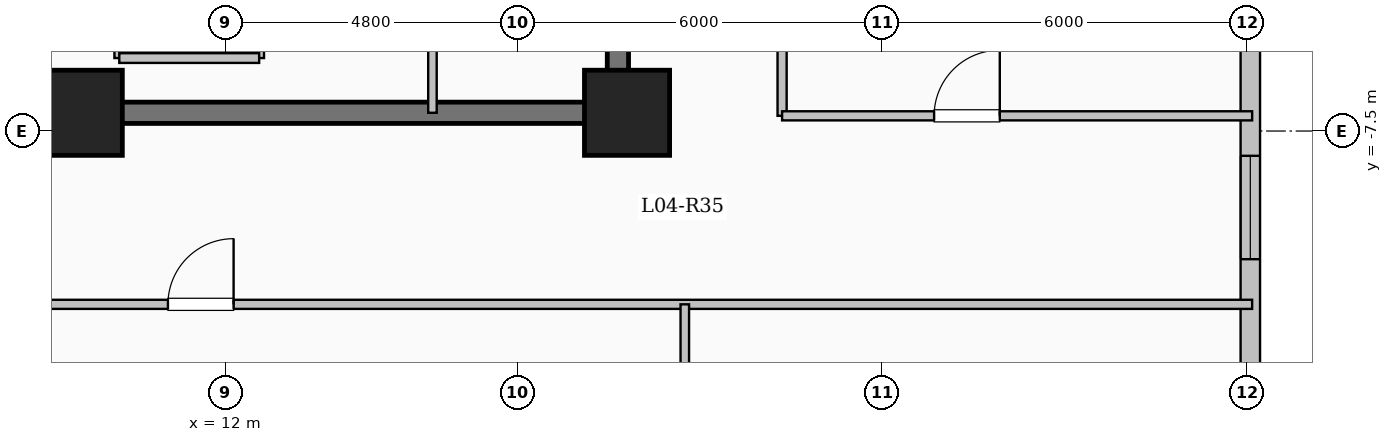
"""IFC4 building model, lengths in metres.
Left out: names, types, materials, properties, quantities, classifications, styles, units other than length and angle.
Written with IfcOpenShell. Run it as: python <this file> out.ifc"""

import sys

from ifc_helpers import new_model, si_unit, direction, frame, frame_2d, origin, origin_2d, place, context, subcontext, project, spatial, rectangle, extrude, element, fill, save


model = new_model("IFC4")
c1 = context("Model", 3, precision=1e-05, world=origin(), true_north=direction((0.0, 1.0)))
c2 = subcontext(c1, "Body", "Model", "MODEL_VIEW")
j1 = project(units=[si_unit("LENGTHUNIT", "METRE"), si_unit("PLANEANGLEUNIT", "RADIAN")], contexts=[c1])
p1 = place(None, origin())
s1 = spatial("IfcSite", under=j1, at=p1, CompositionType="ELEMENT")
p2 = place(p1, origin())
s2 = spatial("IfcBuilding", under=s1, at=p2, CompositionType="ELEMENT")
p3 = place(p2, frame((0.0, 0.0, 18.9)))
s3 = spatial("IfcBuildingStorey", under=s2, at=p3, CompositionType="ELEMENT", Elevation=18.9)
for number, where, z_axis, x_axis in (
    (1, (9.6, -7.2, 0.0), (0.0, 0.0, 1.0), (1.0, 0.0, 0.0)),
    (2, (18.6, -7.2, 0.0), (0.0, 0.0, 1.0), (1.0, 0.0, 0.0)),
):
    element("IfcColumn", number, at=place(p3, frame(where, z_axis=z_axis, x_axis=x_axis)), inside=s3, PredefinedType="COLUMN", context=c2, shape_type="SweptSolid", body=[
        extrude(rectangle(XDim=1.4, YDim=1.4, at=origin_2d()), origin(), (0.0, 0.0, 1.0), 5.1),
    ])
p4 = place(p3, frame((28.85, 26.25, 0.0), z_axis=(0.0, 0.0, 1.0), x_axis=(0.0, -1.0, 0.0)))
e3 = element("IfcWall", 3, at=p4, inside=s3, PredefinedType="SOLIDWALL", context=c2, shape_type="SweptSolid", body=[
    extrude(rectangle(XDim=52.5, YDim=0.32, at=frame_2d((26.25, 0.0))), origin(), (0.0, 0.0, 1.0), 4.85),
])
p5 = place(p4, frame((5.8, 0.0, 0.9)))
e4 = element("IfcOpeningElement", 4, at=p5, cuts=e3, PredefinedType="OPENING", context=c2, shape_type="SweptSolid", body=[
    extrude(rectangle(XDim=2.1, YDim=2.0, at=frame_2d((1.05, 1.0))), frame((0.0, 0.17, 0.0), z_axis=(0.0, -1.0, 0.0), x_axis=(1.0, 0.0, 0.0)), (0.0, 0.0, 1.0), 0.34),
])
p6 = place(p4, frame((14.125, 0.0, 0.95)))
e5 = element("IfcOpeningElement", 5, at=p6, cuts=e3, PredefinedType="OPENING", context=c2, shape_type="SweptSolid", body=[
    extrude(rectangle(XDim=1.0, YDim=1.5, at=frame_2d((0.5, 0.75))), frame((0.0, 0.17, 0.0), z_axis=(0.0, -1.0, 0.0), x_axis=(1.0, 0.0, 0.0)), (0.0, 0.0, 1.0), 0.34),
])
p7 = place(p4, frame((23.45, 0.0, 0.9)))
e6 = element("IfcOpeningElement", 6, at=p7, cuts=e3, PredefinedType="OPENING", context=c2, shape_type="SweptSolid", body=[
    extrude(rectangle(XDim=2.1, YDim=2.0, at=frame_2d((1.05, 1.0))), frame((0.0, 0.17, 0.0), z_axis=(0.0, -1.0, 0.0), x_axis=(1.0, 0.0, 0.0)), (0.0, 0.0, 1.0), 0.34),
])
p8 = place(p4, frame((34.157, 0.0, 0.9)))
e7 = element("IfcOpeningElement", 7, at=p8, cuts=e3, PredefinedType="OPENING", context=c2, shape_type="SweptSolid", body=[
    extrude(rectangle(XDim=1.7, YDim=1.9, at=frame_2d((0.85, 0.95))), frame((0.0, 0.17, 0.0), z_axis=(0.0, -1.0, 0.0), x_axis=(1.0, 0.0, 0.0)), (0.0, 0.0, 1.0), 0.34),
])
for number, where, z_axis, x_axis in (
    (8, (10.25, -6.3, 0.0), (0.0, 0.0, 1.0), (0.0, 1.0, 0.0)),
    (9, (12.55, -6.3, 0.0), (0.0, 0.0, 1.0), (0.0, 1.0, 0.0)),
):
    element("IfcWall", number, at=place(p3, frame(where, z_axis=z_axis, x_axis=x_axis)), inside=s3, PredefinedType="SOLIDWALL", context=c2, shape_type="SweptSolid", body=[
        extrude(rectangle(XDim=2.6, YDim=0.16, at=frame_2d((1.3, 0.0))), origin(), (0.0, 0.0, 1.0), 4.85),
    ])
p9 = place(p3, frame((10.25, -6.3, 0.0), z_axis=(0.0, 0.0, 1.0), x_axis=(1.0, 0.0, 0.0)))
e10 = element("IfcWall", 10, at=p9, inside=s3, PredefinedType="SOLIDWALL", context=c2, shape_type="SweptSolid", body=[
    extrude(rectangle(XDim=2.3, YDim=0.16, at=frame_2d((1.15, 0.0))), origin(), (0.0, 0.0, 1.0), 4.85),
])
p10 = place(p3, frame((18.45, -7.375, 0.0), z_axis=(0.0, 0.0, 1.0), x_axis=(0.0, 1.0, 0.0)))
e11 = element("IfcWall", 11, at=p10, inside=s3, PredefinedType="SHEAR", context=c2, shape_type="SweptSolid", body=[
    extrude(rectangle(XDim=14.05, YDim=0.35, at=frame_2d((7.025, 0.0))), origin(), (0.0, 0.0, 1.0), 5.1),
])
p11 = place(p3, frame((10.075, -7.2, 0.0), z_axis=(0.0, 0.0, 1.0), x_axis=(1.0, 0.0, 0.0)))
e12 = element("IfcWall", 12, at=p11, inside=s3, PredefinedType="SHEAR", context=c2, shape_type="SweptSolid", body=[
    extrude(rectangle(XDim=8.55, YDim=0.35, at=frame_2d((4.275, 0.0))), origin(), (0.0, 0.0, 1.0), 5.1),
])
p12 = place(p3, frame((15.4, -7.2, 0.0), z_axis=(0.0, 0.0, 1.0), x_axis=(0.0, 1.0, 0.0)))
e13 = element("IfcWall", 13, at=p12, inside=s3, PredefinedType="PARTITIONING", context=c2, shape_type="SweptSolid", body=[
    extrude(rectangle(XDim=10.45, YDim=0.14, at=frame_2d((5.225, 0.0))), origin(), (0.0, 0.0, 1.0), 4.85),
])
p13 = place(p12, frame((9.25, 0.0, 0.0)))
e14 = element("IfcOpeningElement", 14, at=p13, cuts=e13, PredefinedType="OPENING", context=c2, shape_type="SweptSolid", body=[
    extrude(rectangle(XDim=0.9, YDim=2.08, at=frame_2d((0.45, 1.04))), frame((0.0, 0.08, 0.0), z_axis=(0.0, -1.0, 0.0), x_axis=(1.0, 0.0, 0.0)), (0.0, 0.0, 1.0), 0.16),
])
p14 = place(p3, frame((21.15, -7.25, 0.0), z_axis=(0.0, 0.0, 1.0), x_axis=(0.0, 1.0, 0.0)))
e15 = element("IfcWall", 15, at=p14, inside=s3, PredefinedType="PARTITIONING", context=c2, shape_type="SweptSolid", body=[
    extrude(rectangle(XDim=18.0, YDim=0.15, at=frame_2d((9.0, 0.0))), origin(), (0.0, 0.0, 1.0), 4.85),
])
p15 = place(p3, frame((8.55, -10.35, 0.0), z_axis=(0.0, 0.0, 1.0), x_axis=(1.0, 0.0, 0.0)))
e16 = element("IfcWall", 16, at=p15, inside=s3, PredefinedType="PARTITIONING", context=c2, shape_type="SweptSolid", body=[
    extrude(rectangle(XDim=20.33, YDim=0.15, at=frame_2d((10.165, 0.0))), origin(), (0.0, 0.0, 1.0), 4.85),
])
p16 = place(p15, frame((2.5, 0.0, 0.0)))
e17 = element("IfcOpeningElement", 17, at=p16, cuts=e16, PredefinedType="OPENING", context=c2, shape_type="SweptSolid", body=[
    extrude(rectangle(XDim=1.08, YDim=2.15, at=frame_2d((0.54, 1.075))), frame((0.0, 0.085, 0.0), z_axis=(0.0, -1.0, 0.0), x_axis=(1.0, 0.0, 0.0)), (0.0, 0.0, 1.0), 0.17),
])
p17 = place(p3, frame((19.55, -19.56, 0.0), z_axis=(0.0, 0.0, 1.0), x_axis=(0.0, 1.0, 0.0)))
e18 = element("IfcWall", 18, at=p17, inside=s3, PredefinedType="PARTITIONING", context=c2, shape_type="SweptSolid", body=[
    extrude(rectangle(XDim=9.21, YDim=0.14, at=frame_2d((4.605, 0.0))), origin(), (0.0, 0.0, 1.0), 4.85),
])
p18 = place(p3, frame((21.15, -7.25, 0.0), z_axis=(0.0, 0.0, 1.0), x_axis=(1.0, 0.0, 0.0)))
e19 = element("IfcWall", 19, at=p18, inside=s3, PredefinedType="PARTITIONING", context=c2, shape_type="SweptSolid", body=[
    extrude(rectangle(XDim=7.73, YDim=0.15, at=frame_2d((3.865, 0.0))), origin(), (0.0, 0.0, 1.0), 4.85),
])
p19 = place(p18, frame((2.5, 0.0, 0.0)))
e20 = element("IfcOpeningElement", 20, at=p19, cuts=e19, PredefinedType="OPENING", context=c2, shape_type="SweptSolid", body=[
    extrude(rectangle(XDim=1.08, YDim=2.15, at=frame_2d((0.54, 1.075))), frame((0.0, 0.085, 0.0), z_axis=(0.0, -1.0, 0.0), x_axis=(1.0, 0.0, 0.0)), (0.0, 0.0, 1.0), 0.17),
])
p20 = place(p8, origin())
e21 = element("IfcWindow", 21, at=p20, inside=s3, PartitioningType="SINGLE_PANEL", PredefinedType="WINDOW", context=c2, shape_type="SweptSolid", body=[
    extrude(rectangle(XDim=1.7, YDim=1.9, at=frame_2d((0.85, 0.95))), frame((0.0, 0.03, 0.0), z_axis=(0.0, -1.0, 0.0), x_axis=(1.0, 0.0, 0.0)), (0.0, 0.0, 1.0), 0.06),
])
fill(e7, e21)
p21 = place(p16, origin())
e22 = element("IfcDoor", 22, at=p21, inside=s3, OperationType="SINGLE_SWING_RIGHT", PredefinedType="DOOR", context=c2, shape_type="SweptSolid", body=[
    extrude(rectangle(XDim=1.08, YDim=2.15, at=frame_2d((0.54, 1.075))), frame((0.0, 0.025, 0.0), z_axis=(0.0, -1.0, 0.0), x_axis=(1.0, 0.0, 0.0)), (0.0, 0.0, 1.0), 0.05),
])
fill(e17, e22)
p22 = place(p19, origin())
e23 = element("IfcDoor", 23, at=p22, inside=s3, OperationType="SINGLE_SWING_RIGHT", PredefinedType="DOOR", context=c2, shape_type="SweptSolid", body=[
    extrude(rectangle(XDim=1.08, YDim=2.15, at=frame_2d((0.54, 1.075))), frame((0.0, 0.025, 0.0), z_axis=(0.0, -1.0, 0.0), x_axis=(1.0, 0.0, 0.0)), (0.0, 0.0, 1.0), 0.05),
])
fill(e20, e23)
save(model, sys.argv[1])
